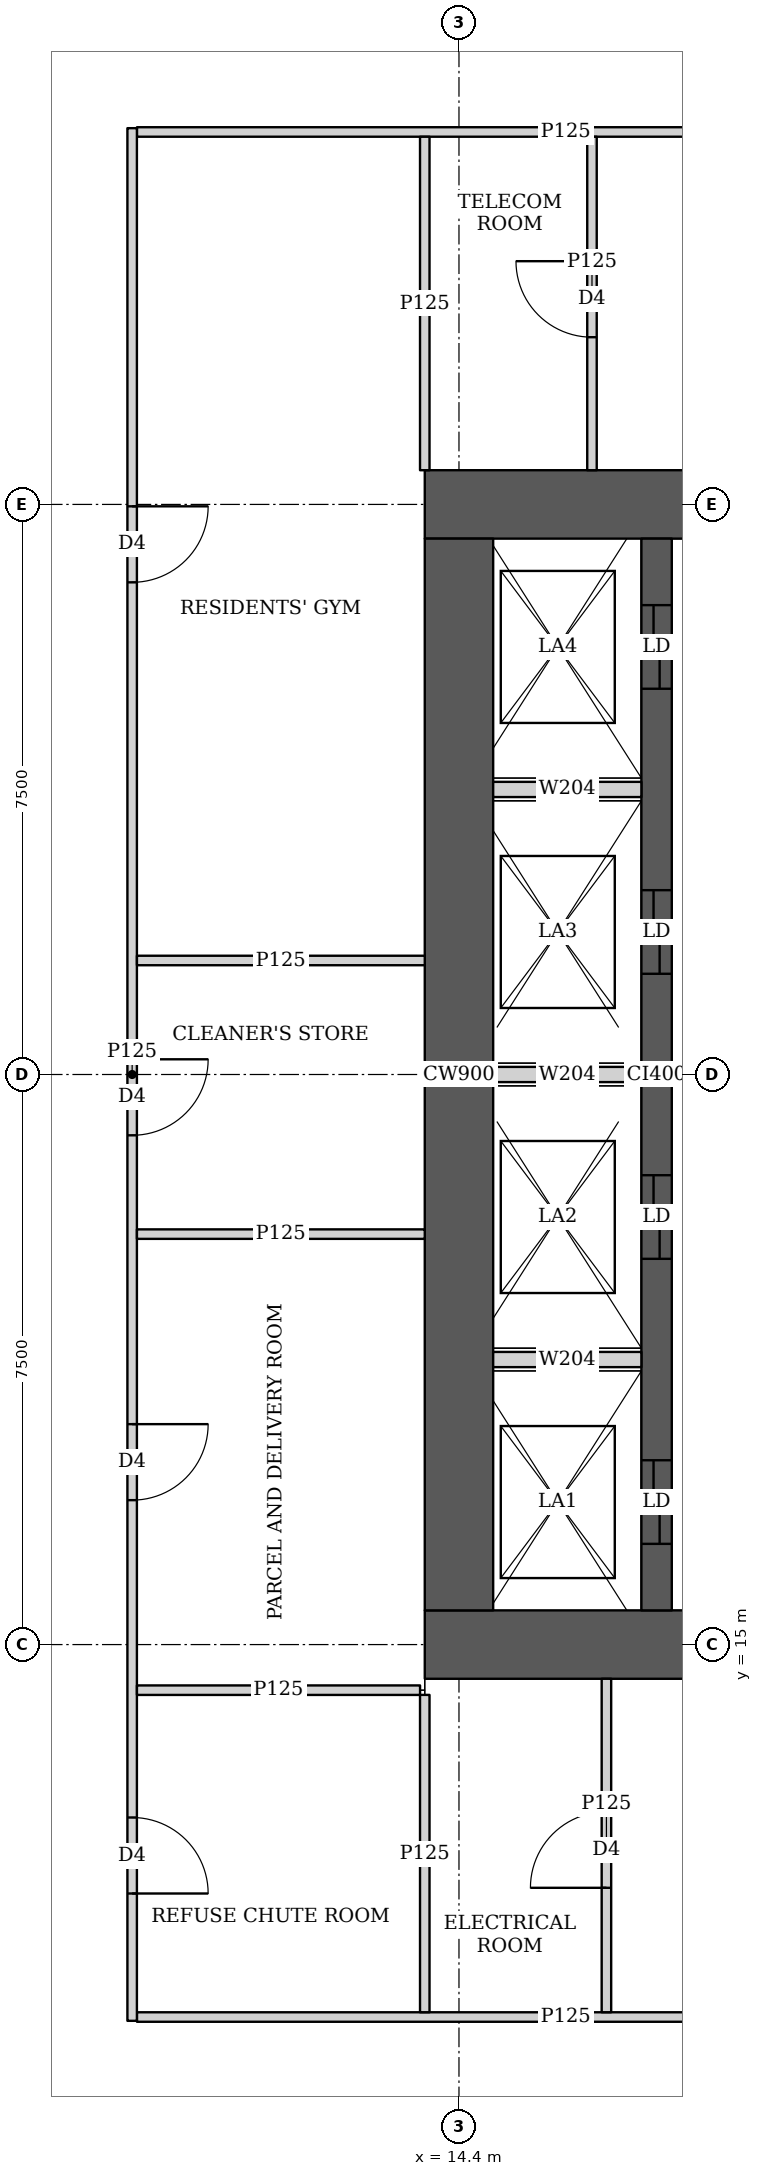
"""IFC4 building model, lengths in metres.
Left out: names, types, materials, properties, quantities, classifications, styles, units other than length and angle.
Written with IfcOpenShell. Run it as: python <this file> out.ifc"""

import sys

from ifc_helpers import new_model, si_unit, direction, frame, frame_2d, origin, place, context, subcontext, project, spatial, rectangle, extrude, element, fill, save


model = new_model("IFC4")
c1 = context("Model", 3, precision=1e-05, world=origin(), true_north=direction((0.0, 1.0)))
c2 = subcontext(c1, "Body", "Model", "MODEL_VIEW")
j1 = project(units=[si_unit("LENGTHUNIT", "METRE"), si_unit("PLANEANGLEUNIT", "RADIAN")], contexts=[c1])
p1 = place(None, origin())
s1 = spatial("IfcSite", under=j1, at=p1, CompositionType="ELEMENT")
p2 = place(p1, origin())
s2 = spatial("IfcBuilding", under=s1, at=p2, CompositionType="ELEMENT")
p3 = place(p2, frame((0.0, 0.0, 31.25)))
s3 = spatial("IfcBuildingStorey", under=s2, at=p3, CompositionType="ELEMENT", Elevation=31.25)
p4 = place(p3, frame((13.95, 15.0, 0.0), z_axis=(0.0, 0.0, 1.0), x_axis=(1.0, 0.0, 0.0)))
e1 = element("IfcWall", 1, at=p4, inside=s3, PredefinedType="SHEAR", context=c2, shape_type="SweptSolid", body=[
    extrude(rectangle(XDim=15.3, YDim=0.9, at=frame_2d((7.65, 0.0))), origin(), (0.0, 0.0, 1.0), 3.75),
])
p5 = place(p4, frame((4.45, 0.0, 0.0)))
e2 = element("IfcOpeningElement", 2, at=p5, cuts=e1, PredefinedType="OPENING", context=c2, shape_type="SweptSolid", body=[
    extrude(rectangle(XDim=1.8, YDim=2.1, at=frame_2d((0.9, 1.05))), frame((0.0, 0.46, 0.0), z_axis=(0.0, -1.0, 0.0), x_axis=(1.0, 0.0, 0.0)), (0.0, 0.0, 1.0), 0.92),
])
p6 = place(p4, frame((10.7, 0.0, 0.0)))
e3 = element("IfcOpeningElement", 3, at=p6, cuts=e1, PredefinedType="OPENING", context=c2, shape_type="SweptSolid", body=[
    extrude(rectangle(XDim=1.1, YDim=2.1, at=frame_2d((0.55, 1.05))), frame((0.0, 0.46, 0.0), z_axis=(0.0, -1.0, 0.0), x_axis=(1.0, 0.0, 0.0)), (0.0, 0.0, 1.0), 0.92),
])
p7 = place(p3, frame((13.95, 30.0, 0.0), z_axis=(0.0, 0.0, 1.0), x_axis=(1.0, 0.0, 0.0)))
e4 = element("IfcWall", 4, at=p7, inside=s3, PredefinedType="SHEAR", context=c2, shape_type="SweptSolid", body=[
    extrude(rectangle(XDim=15.3, YDim=0.9, at=frame_2d((7.65, 0.0))), origin(), (0.0, 0.0, 1.0), 3.75),
])
p8 = place(p7, frame((4.45, 0.0, 0.0)))
e5 = element("IfcOpeningElement", 5, at=p8, cuts=e4, PredefinedType="OPENING", context=c2, shape_type="SweptSolid", body=[
    extrude(rectangle(XDim=1.8, YDim=2.1, at=frame_2d((0.9, 1.05))), frame((0.0, 0.46, 0.0), z_axis=(0.0, -1.0, 0.0), x_axis=(1.0, 0.0, 0.0)), (0.0, 0.0, 1.0), 0.92),
])
p9 = place(p7, frame((10.7, 0.0, 0.0)))
e6 = element("IfcOpeningElement", 6, at=p9, cuts=e4, PredefinedType="OPENING", context=c2, shape_type="SweptSolid", body=[
    extrude(rectangle(XDim=1.1, YDim=2.1, at=frame_2d((0.55, 1.05))), frame((0.0, 0.46, 0.0), z_axis=(0.0, -1.0, 0.0), x_axis=(1.0, 0.0, 0.0)), (0.0, 0.0, 1.0), 0.92),
])
p10 = place(p3, frame((14.4, 15.45, 0.0), z_axis=(0.0, 0.0, 1.0), x_axis=(0.0, 1.0, 0.0)))
e7 = element("IfcWall", 7, at=p10, inside=s3, PredefinedType="SHEAR", context=c2, shape_type="SweptSolid", body=[
    extrude(rectangle(XDim=14.1, YDim=0.9, at=frame_2d((7.05, 0.0))), origin(), (0.0, 0.0, 1.0), 3.75),
])
p11 = place(p3, frame((17.0, 15.45, 0.0), z_axis=(0.0, 0.0, 1.0), x_axis=(0.0, 1.0, 0.0)))
e8 = element("IfcWall", 8, at=p11, inside=s3, PredefinedType="SHEAR", context=c2, shape_type="SweptSolid", body=[
    extrude(rectangle(XDim=14.1, YDim=0.4, at=frame_2d((7.05, 0.0))), origin(), (0.0, 0.0, 1.0), 3.75),
])
p12 = place(p11, frame((0.875, 0.0, 0.0)))
e9 = element("IfcOpeningElement", 9, at=p12, cuts=e8, PredefinedType="OPENING", context=c2, shape_type="SweptSolid", body=[
    extrude(rectangle(XDim=1.1, YDim=2.1, at=frame_2d((0.55, 1.05))), frame((0.0, 0.21, 0.0), z_axis=(0.0, -1.0, 0.0), x_axis=(1.0, 0.0, 0.0)), (0.0, 0.0, 1.0), 0.42),
])
p13 = place(p11, frame((4.625, 0.0, 0.0)))
e10 = element("IfcOpeningElement", 10, at=p13, cuts=e8, PredefinedType="OPENING", context=c2, shape_type="SweptSolid", body=[
    extrude(rectangle(XDim=1.1, YDim=2.1, at=frame_2d((0.55, 1.05))), frame((0.0, 0.21, 0.0), z_axis=(0.0, -1.0, 0.0), x_axis=(1.0, 0.0, 0.0)), (0.0, 0.0, 1.0), 0.42),
])
p14 = place(p11, frame((8.375, 0.0, 0.0)))
e11 = element("IfcOpeningElement", 11, at=p14, cuts=e8, PredefinedType="OPENING", context=c2, shape_type="SweptSolid", body=[
    extrude(rectangle(XDim=1.1, YDim=2.1, at=frame_2d((0.55, 1.05))), frame((0.0, 0.21, 0.0), z_axis=(0.0, -1.0, 0.0), x_axis=(1.0, 0.0, 0.0)), (0.0, 0.0, 1.0), 0.42),
])
p15 = place(p11, frame((12.125, 0.0, 0.0)))
e12 = element("IfcOpeningElement", 12, at=p15, cuts=e8, PredefinedType="OPENING", context=c2, shape_type="SweptSolid", body=[
    extrude(rectangle(XDim=1.1, YDim=2.1, at=frame_2d((0.55, 1.05))), frame((0.0, 0.21, 0.0), z_axis=(0.0, -1.0, 0.0), x_axis=(1.0, 0.0, 0.0)), (0.0, 0.0, 1.0), 0.42),
])
p16 = place(p3, frame((10.1, 10.05, 0.0), z_axis=(0.0, 0.0, 1.0), x_axis=(0.0, 1.0, 0.0)))
e13 = element("IfcWall", 13, at=p16, inside=s3, PredefinedType="PARTITIONING", context=c2, shape_type="SweptSolid", body=[
    extrude(rectangle(XDim=24.9, YDim=0.125, at=frame_2d((12.45, 0.0))), origin(), (0.0, 0.0, 1.0), 3.5),
])
p17 = place(p16, frame((1.675, 0.0, 0.0)))
e14 = element("IfcOpeningElement", 14, at=p17, cuts=e13, PredefinedType="OPENING", context=c2, shape_type="SweptSolid", body=[
    extrude(rectangle(XDim=1.0, YDim=2.1, at=frame_2d((0.5, 1.05))), frame((0.0, 0.073, 0.0), z_axis=(0.0, -1.0, 0.0), x_axis=(1.0, 0.0, 0.0)), (0.0, 0.0, 1.0), 0.145),
])
p18 = place(p16, frame((6.85, 0.0, 0.0)))
e15 = element("IfcOpeningElement", 15, at=p18, cuts=e13, PredefinedType="OPENING", context=c2, shape_type="SweptSolid", body=[
    extrude(rectangle(XDim=1.0, YDim=2.1, at=frame_2d((0.5, 1.05))), frame((0.0, 0.073, 0.0), z_axis=(0.0, -1.0, 0.0), x_axis=(1.0, 0.0, 0.0)), (0.0, 0.0, 1.0), 0.145),
])
p19 = place(p16, frame((11.65, 0.0, 0.0)))
e16 = element("IfcOpeningElement", 16, at=p19, cuts=e13, PredefinedType="OPENING", context=c2, shape_type="SweptSolid", body=[
    extrude(rectangle(XDim=1.0, YDim=2.1, at=frame_2d((0.5, 1.05))), frame((0.0, 0.073, 0.0), z_axis=(0.0, -1.0, 0.0), x_axis=(1.0, 0.0, 0.0)), (0.0, 0.0, 1.0), 0.145),
])
p20 = place(p16, frame((18.925, 0.0, 0.0)))
e17 = element("IfcOpeningElement", 17, at=p20, cuts=e13, PredefinedType="OPENING", context=c2, shape_type="SweptSolid", body=[
    extrude(rectangle(XDim=1.0, YDim=2.1, at=frame_2d((0.5, 1.05))), frame((0.0, 0.073, 0.0), z_axis=(0.0, -1.0, 0.0), x_axis=(1.0, 0.0, 0.0)), (0.0, 0.0, 1.0), 0.145),
])
p21 = place(p3, frame((10.163, 14.4, 0.0), z_axis=(0.0, 0.0, 1.0), x_axis=(1.0, 0.0, 0.0)))
e18 = element("IfcWall", 18, at=p21, inside=s3, PredefinedType="PARTITIONING", context=c2, shape_type="SweptSolid", body=[
    extrude(rectangle(XDim=3.725, YDim=0.125, at=frame_2d((1.862, 0.0))), origin(), (0.0, 0.0, 1.0), 3.5),
])
for number, where, z_axis, x_axis in (
    (19, (10.163, 20.4, 0.0), (0.0, 0.0, 1.0), (1.0, 0.0, 0.0)),
    (20, (10.163, 24.0, 0.0), (0.0, 0.0, 1.0), (1.0, 0.0, 0.0)),
):
    element("IfcWall", number, at=place(p3, frame(where, z_axis=z_axis, x_axis=x_axis)), inside=s3, PredefinedType="PARTITIONING", context=c2, shape_type="SweptSolid", body=[
        extrude(rectangle(XDim=3.787, YDim=0.125, at=frame_2d((1.894, 0.0))), origin(), (0.0, 0.0, 1.0), 3.5),
    ])
p22 = place(p3, frame((13.95, 10.163, 0.0), z_axis=(0.0, 0.0, 1.0), x_axis=(0.0, 1.0, 0.0)))
e21 = element("IfcWall", 21, at=p22, inside=s3, PredefinedType="PARTITIONING", context=c2, shape_type="SweptSolid", body=[
    extrude(rectangle(XDim=4.175, YDim=0.125, at=frame_2d((2.087, 0.0))), origin(), (0.0, 0.0, 1.0), 3.5),
])
p23 = place(p3, frame((13.95, 30.45, 0.0), z_axis=(0.0, 0.0, 1.0), x_axis=(0.0, 1.0, 0.0)))
e22 = element("IfcWall", 22, at=p23, inside=s3, PredefinedType="PARTITIONING", context=c2, shape_type="SweptSolid", body=[
    extrude(rectangle(XDim=4.387, YDim=0.125, at=frame_2d((2.193, 0.0))), origin(), (0.0, 0.0, 1.0), 3.5),
])
p24 = place(p3, frame((10.163, 10.1, 0.0), z_axis=(0.0, 0.0, 1.0), x_axis=(1.0, 0.0, 0.0)))
e23 = element("IfcWall", 23, at=p24, inside=s3, PredefinedType="PARTITIONING", context=c2, shape_type="SweptSolid", body=[
    extrude(rectangle(XDim=11.287, YDim=0.125, at=frame_2d((5.644, 0.0))), origin(), (0.0, 0.0, 1.0), 3.5),
])
p25 = place(p24, frame((7.832, 0.0, 0.0)))
e24 = element("IfcOpeningElement", 24, at=p25, cuts=e23, PredefinedType="OPENING", context=c2, shape_type="SweptSolid", body=[
    extrude(rectangle(XDim=1.8, YDim=2.1, at=frame_2d((0.9, 1.05))), frame((0.0, 0.073, 0.0), z_axis=(0.0, -1.0, 0.0), x_axis=(1.0, 0.0, 0.0)), (0.0, 0.0, 1.0), 0.145),
])
p26 = place(p3, frame((10.163, 34.9, 0.0), z_axis=(0.0, 0.0, 1.0), x_axis=(1.0, 0.0, 0.0)))
e25 = element("IfcWall", 25, at=p26, inside=s3, PredefinedType="PARTITIONING", context=c2, shape_type="SweptSolid", body=[
    extrude(rectangle(XDim=11.287, YDim=0.125, at=frame_2d((5.644, 0.0))), origin(), (0.0, 0.0, 1.0), 3.5),
])
p27 = place(p26, frame((7.737, 0.0, 0.0)))
e26 = element("IfcOpeningElement", 26, at=p27, cuts=e25, PredefinedType="OPENING", context=c2, shape_type="SweptSolid", body=[
    extrude(rectangle(XDim=1.8, YDim=2.1, at=frame_2d((0.9, 1.05))), frame((0.0, 0.073, 0.0), z_axis=(0.0, -1.0, 0.0), x_axis=(1.0, 0.0, 0.0)), (0.0, 0.0, 1.0), 0.145),
])
p28 = place(p3, frame((16.34, 10.163, 0.0), z_axis=(0.0, 0.0, 1.0), x_axis=(0.0, 1.0, 0.0)))
e27 = element("IfcWall", 27, at=p28, inside=s3, PredefinedType="PARTITIONING", context=c2, shape_type="SweptSolid", body=[
    extrude(rectangle(XDim=4.387, YDim=0.125, at=frame_2d((2.193, 0.0))), origin(), (0.0, 0.0, 1.0), 3.5),
])
p29 = place(p28, frame((1.637, 0.0, 0.0)))
e28 = element("IfcOpeningElement", 28, at=p29, cuts=e27, PredefinedType="OPENING", context=c2, shape_type="SweptSolid", body=[
    extrude(rectangle(XDim=1.0, YDim=2.1, at=frame_2d((0.5, 1.05))), frame((0.0, 0.073, 0.0), z_axis=(0.0, -1.0, 0.0), x_axis=(1.0, 0.0, 0.0)), (0.0, 0.0, 1.0), 0.145),
])
p30 = place(p3, frame((16.15, 30.45, 0.0), z_axis=(0.0, 0.0, 1.0), x_axis=(0.0, 1.0, 0.0)))
e29 = element("IfcWall", 29, at=p30, inside=s3, PredefinedType="PARTITIONING", context=c2, shape_type="SweptSolid", body=[
    extrude(rectangle(XDim=4.387, YDim=0.125, at=frame_2d((2.193, 0.0))), origin(), (0.0, 0.0, 1.0), 3.5),
])
p31 = place(p30, frame((1.75, 0.0, 0.0)))
e30 = element("IfcOpeningElement", 30, at=p31, cuts=e29, PredefinedType="OPENING", context=c2, shape_type="SweptSolid", body=[
    extrude(rectangle(XDim=1.0, YDim=2.1, at=frame_2d((0.5, 1.05))), frame((0.0, 0.073, 0.0), z_axis=(0.0, -1.0, 0.0), x_axis=(1.0, 0.0, 0.0)), (0.0, 0.0, 1.0), 0.145),
])
for number, where, z_axis, x_axis in (
    (31, (14.85, 18.75, 0.0), (0.0, 0.0, 1.0), (1.0, 0.0, 0.0)),
    (32, (14.85, 22.5, 0.0), (0.0, 0.0, 1.0), (1.0, 0.0, 0.0)),
    (33, (14.85, 26.25, 0.0), (0.0, 0.0, 1.0), (1.0, 0.0, 0.0)),
):
    element("IfcWall", number, at=place(p3, frame(where, z_axis=z_axis, x_axis=x_axis)), inside=s3, PredefinedType="SOLIDWALL", context=c2, shape_type="SweptSolid", body=[
        extrude(rectangle(XDim=1.95, YDim=0.2, at=frame_2d((0.975, 0.0))), origin(), (0.0, 0.0, 1.0), 3.5),
    ])
p32 = place(p17, origin())
e34 = element("IfcDoor", 34, at=p32, inside=s3, OperationType="SINGLE_SWING_RIGHT", PredefinedType="DOOR", context=c2, shape_type="SweptSolid", body=[
    extrude(rectangle(XDim=1.0, YDim=2.1, at=frame_2d((0.5, 1.05))), frame((0.0, 0.025, 0.0), z_axis=(0.0, -1.0, 0.0), x_axis=(1.0, 0.0, 0.0)), (0.0, 0.0, 1.0), 0.05),
])
fill(e14, e34)
p33 = place(p18, origin())
e35 = element("IfcDoor", 35, at=p33, inside=s3, OperationType="SINGLE_SWING_LEFT", PredefinedType="DOOR", context=c2, shape_type="SweptSolid", body=[
    extrude(rectangle(XDim=1.0, YDim=2.1, at=frame_2d((0.5, 1.05))), frame((0.0, 0.025, 0.0), z_axis=(0.0, -1.0, 0.0), x_axis=(1.0, 0.0, 0.0)), (0.0, 0.0, 1.0), 0.05),
])
fill(e15, e35)
p34 = place(p19, origin())
e36 = element("IfcDoor", 36, at=p34, inside=s3, OperationType="SINGLE_SWING_LEFT", PredefinedType="DOOR", context=c2, shape_type="SweptSolid", body=[
    extrude(rectangle(XDim=1.0, YDim=2.1, at=frame_2d((0.5, 1.05))), frame((0.0, 0.025, 0.0), z_axis=(0.0, -1.0, 0.0), x_axis=(1.0, 0.0, 0.0)), (0.0, 0.0, 1.0), 0.05),
])
fill(e16, e36)
p35 = place(p20, origin())
e37 = element("IfcDoor", 37, at=p35, inside=s3, OperationType="SINGLE_SWING_LEFT", PredefinedType="DOOR", context=c2, shape_type="SweptSolid", body=[
    extrude(rectangle(XDim=1.0, YDim=2.1, at=frame_2d((0.5, 1.05))), frame((0.0, 0.025, 0.0), z_axis=(0.0, -1.0, 0.0), x_axis=(1.0, 0.0, 0.0)), (0.0, 0.0, 1.0), 0.05),
])
fill(e17, e37)
p36 = place(p29, origin())
e38 = element("IfcDoor", 38, at=p36, inside=s3, OperationType="SINGLE_SWING_LEFT", PredefinedType="DOOR", context=c2, shape_type="SweptSolid", body=[
    extrude(rectangle(XDim=1.0, YDim=2.1, at=frame_2d((0.5, 1.05))), frame((0.0, 0.025, 0.0), z_axis=(0.0, -1.0, 0.0), x_axis=(1.0, 0.0, 0.0)), (0.0, 0.0, 1.0), 0.05),
])
fill(e28, e38)
p37 = place(p31, origin())
e39 = element("IfcDoor", 39, at=p37, inside=s3, OperationType="SINGLE_SWING_RIGHT", PredefinedType="DOOR", context=c2, shape_type="SweptSolid", body=[
    extrude(rectangle(XDim=1.0, YDim=2.1, at=frame_2d((0.5, 1.05))), frame((0.0, 0.025, 0.0), z_axis=(0.0, -1.0, 0.0), x_axis=(1.0, 0.0, 0.0)), (0.0, 0.0, 1.0), 0.05),
])
fill(e30, e39)
p38 = place(p12, origin())
e40 = element("IfcDoor", 40, at=p38, inside=s3, OperationType="DOUBLE_DOOR_SLIDING", PredefinedType="DOOR", context=c2, shape_type="SweptSolid", body=[
    extrude(rectangle(XDim=1.1, YDim=2.1, at=frame_2d((0.55, 1.05))), frame((0.0, 0.025, 0.0), z_axis=(0.0, -1.0, 0.0), x_axis=(1.0, 0.0, 0.0)), (0.0, 0.0, 1.0), 0.05),
])
fill(e9, e40)
p39 = place(p13, origin())
e41 = element("IfcDoor", 41, at=p39, inside=s3, OperationType="DOUBLE_DOOR_SLIDING", PredefinedType="DOOR", context=c2, shape_type="SweptSolid", body=[
    extrude(rectangle(XDim=1.1, YDim=2.1, at=frame_2d((0.55, 1.05))), frame((0.0, 0.025, 0.0), z_axis=(0.0, -1.0, 0.0), x_axis=(1.0, 0.0, 0.0)), (0.0, 0.0, 1.0), 0.05),
])
fill(e10, e41)
p40 = place(p14, origin())
e42 = element("IfcDoor", 42, at=p40, inside=s3, OperationType="DOUBLE_DOOR_SLIDING", PredefinedType="DOOR", context=c2, shape_type="SweptSolid", body=[
    extrude(rectangle(XDim=1.1, YDim=2.1, at=frame_2d((0.55, 1.05))), frame((0.0, 0.025, 0.0), z_axis=(0.0, -1.0, 0.0), x_axis=(1.0, 0.0, 0.0)), (0.0, 0.0, 1.0), 0.05),
])
fill(e11, e42)
p41 = place(p15, origin())
e43 = element("IfcDoor", 43, at=p41, inside=s3, OperationType="DOUBLE_DOOR_SLIDING", PredefinedType="DOOR", context=c2, shape_type="SweptSolid", body=[
    extrude(rectangle(XDim=1.1, YDim=2.1, at=frame_2d((0.55, 1.05))), frame((0.0, 0.025, 0.0), z_axis=(0.0, -1.0, 0.0), x_axis=(1.0, 0.0, 0.0)), (0.0, 0.0, 1.0), 0.05),
])
fill(e12, e43)
save(model, sys.argv[1])
